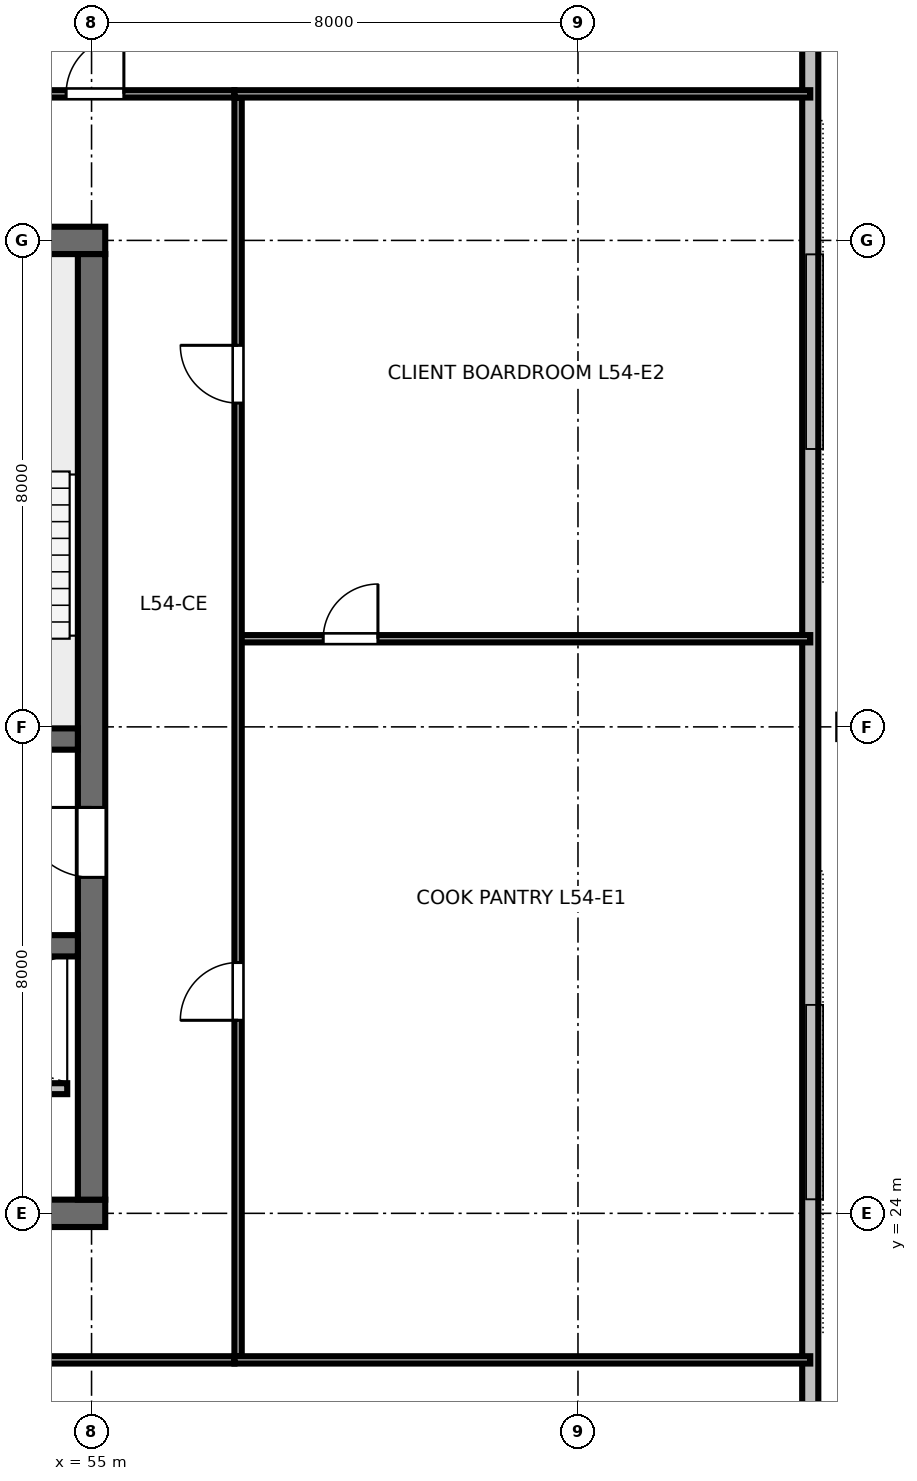
"""IFC4 building model, lengths in metres.
Left out: names, types, materials, properties, quantities, classifications, styles, units other than length and angle.
Written with IfcOpenShell. Run it as: python <this file> out.ifc"""

import sys

from ifc_helpers import new_model, si_unit, direction, frame, frame_2d, origin, origin_2d, place, context, subcontext, project, spatial, rectangle, i_section, extrude, element, fill, save


model = new_model("IFC4")
c1 = context("Model", 3, precision=1e-05, world=origin(), true_north=direction((0.0, 1.0)))
c2 = subcontext(c1, "Body", "Model", "MODEL_VIEW")
j1 = project(units=[si_unit("LENGTHUNIT", "METRE"), si_unit("PLANEANGLEUNIT", "RADIAN")], contexts=[c1])
p1 = place(None, origin())
s1 = spatial("IfcSite", under=j1, at=p1, CompositionType="ELEMENT")
p2 = place(p1, origin())
s2 = spatial("IfcBuilding", under=s1, at=p2, CompositionType="ELEMENT")
p3 = place(p2, frame((0.0, 0.0, 205.8)))
s3 = spatial("IfcBuildingStorey", under=s2, at=p3, CompositionType="ELEMENT", Elevation=205.8)
p4 = place(p3, frame((36.775, 24.0, 0.0), z_axis=(0.0, 0.0, 1.0), x_axis=(1.0, 0.0, 0.0)))
e1 = element("IfcWall", 1, at=p4, inside=s3, PredefinedType="SHEAR", context=c2, shape_type="SweptSolid", body=[
    extrude(rectangle(XDim=18.45, YDim=0.45, at=frame_2d((9.225, 0.0))), origin(), (0.0, 0.0, 1.0), 3.36),
])
p5 = place(p4, frame((13.425, 0.0, 0.0)))
e2 = element("IfcOpeningElement", 2, at=p5, cuts=e1, PredefinedType="OPENING", context=c2, shape_type="SweptSolid", body=[
    extrude(rectangle(XDim=1.6, YDim=2.15, at=frame_2d((0.8, 1.075))), frame((0.0, 0.235, 0.0), z_axis=(0.0, -1.0, 0.0), x_axis=(1.0, 0.0, 0.0)), (0.0, 0.0, 1.0), 0.47),
])
p6 = place(p3, frame((36.775, 40.0, 0.0), z_axis=(0.0, 0.0, 1.0), x_axis=(1.0, 0.0, 0.0)))
e3 = element("IfcWall", 3, at=p6, inside=s3, PredefinedType="SHEAR", context=c2, shape_type="SweptSolid", body=[
    extrude(rectangle(XDim=18.45, YDim=0.45, at=frame_2d((9.225, 0.0))), origin(), (0.0, 0.0, 1.0), 3.36),
])
p7 = place(p6, frame((8.725, 0.0, 0.0)))
e4 = element("IfcOpeningElement", 4, at=p7, cuts=e3, PredefinedType="OPENING", context=c2, shape_type="SweptSolid", body=[
    extrude(rectangle(XDim=1.0, YDim=2.15, at=frame_2d((0.5, 1.075))), frame((0.0, 0.235, 0.0), z_axis=(0.0, -1.0, 0.0), x_axis=(1.0, 0.0, 0.0)), (0.0, 0.0, 1.0), 0.47),
])
p8 = place(p3, frame((55.0, 24.225, 0.0), z_axis=(0.0, 0.0, 1.0), x_axis=(0.0, 1.0, 0.0)))
e5 = element("IfcWall", 5, at=p8, inside=s3, PredefinedType="SHEAR", context=c2, shape_type="SweptSolid", body=[
    extrude(rectangle(XDim=15.55, YDim=0.45, at=frame_2d((7.775, 0.0))), origin(), (0.0, 0.0, 1.0), 3.36),
])
p9 = place(p8, frame((5.3, 0.0, 0.0)))
e6 = element("IfcOpeningElement", 6, at=p9, cuts=e5, PredefinedType="OPENING", context=c2, shape_type="SweptSolid", body=[
    extrude(rectangle(XDim=1.15, YDim=2.15, at=frame_2d((0.575, 1.075))), frame((0.0, 0.235, 0.0), z_axis=(0.0, -1.0, 0.0), x_axis=(1.0, 0.0, 0.0)), (0.0, 0.0, 1.0), 0.47),
])
p10 = place(p3, frame((37.225, 31.8, 0.0), z_axis=(0.0, 0.0, 1.0), x_axis=(1.0, 0.0, 0.0)))
e7 = element("IfcWall", 7, at=p10, inside=s3, PredefinedType="SHEAR", context=c2, shape_type="SweptSolid", body=[
    extrude(rectangle(XDim=17.55, YDim=0.35, at=frame_2d((8.775, 0.0))), origin(), (0.0, 0.0, 1.0), 3.36),
])
p11 = place(p10, frame((0.825, 0.0, 0.0)))
e8 = element("IfcOpeningElement", 8, at=p11, cuts=e7, PredefinedType="OPENING", context=c2, shape_type="SweptSolid", body=[
    extrude(rectangle(XDim=1.1, YDim=2.15, at=frame_2d((0.55, 1.075))), frame((0.0, 0.185, 0.0), z_axis=(0.0, -1.0, 0.0), x_axis=(1.0, 0.0, 0.0)), (0.0, 0.0, 1.0), 0.37),
])
p12 = place(p10, frame((14.725, 0.0, 0.0)))
e9 = element("IfcOpeningElement", 9, at=p12, cuts=e7, PredefinedType="OPENING", context=c2, shape_type="SweptSolid", body=[
    extrude(rectangle(XDim=1.1, YDim=2.15, at=frame_2d((0.55, 1.075))), frame((0.0, 0.185, 0.0), z_axis=(0.0, -1.0, 0.0), x_axis=(1.0, 0.0, 0.0)), (0.0, 0.0, 1.0), 0.37),
])
p13 = place(p3, frame((37.225, 28.4, 0.0), z_axis=(0.0, 0.0, 1.0), x_axis=(1.0, 0.0, 0.0)))
e10 = element("IfcWall", 10, at=p13, inside=s3, PredefinedType="SHEAR", context=c2, shape_type="SweptSolid", body=[
    extrude(rectangle(XDim=17.55, YDim=0.35, at=frame_2d((8.775, 0.0))), origin(), (0.0, 0.0, 1.0), 3.36),
])
p14 = place(p3, frame((67.48, 32.0, 0.0), z_axis=(-0.178954370443, 0.0, 0.98385737447), x_axis=(0.98385737447, 0.0, 0.178954370443)))
e11 = element("IfcColumn", 11, at=p14, inside=s3, PredefinedType="COLUMN", context=c2, shape_type="SweptSolid", body=[
    extrude(i_section(OverallWidth=0.401, OverallDepth=0.399, WebThickness=0.025, FlangeThickness=0.04, FilletRadius=0.025, at=origin_2d()), origin(), (0.0, 0.0, 1.0), 3.428),
])
p15 = place(p3, frame((66.82, 18.76, 0.0), z_axis=(0.0, 0.0, 1.0), x_axis=(0.0, 1.0, 0.0)))
e12 = element("IfcWall", 12, at=p15, inside=s3, PredefinedType="STANDARD", context=c2, shape_type="SweptSolid", body=[
    extrude(rectangle(XDim=26.48, YDim=0.265, at=frame_2d((13.24, 0.0))), origin(), (0.0, 0.0, 1.0), 2.832),
])
p16 = place(p3, frame((47.6, 26.05, 0.0), z_axis=(0.0, 0.0, 1.0), x_axis=(1.0, 0.0, 0.0)))
e13 = element("IfcWall", 13, at=p16, inside=s3, PredefinedType="PARTITIONING", context=c2, shape_type="SweptSolid", body=[
    extrude(rectangle(XDim=7.0, YDim=0.18, at=frame_2d((3.5, 0.0))), origin(), (0.0, 0.0, 1.0), 3.375),
])
p17 = place(p16, frame((1.2, 0.0, 0.0)))
e14 = element("IfcOpeningElement", 14, at=p17, cuts=e13, PredefinedType="OPENING", context=c2, shape_type="SweptSolid", body=[
    extrude(rectangle(XDim=1.05, YDim=2.15, at=frame_2d((0.525, 1.075))), frame((0.0, 0.1, 0.0), z_axis=(0.0, -1.0, 0.0), x_axis=(1.0, 0.0, 0.0)), (0.0, 0.0, 1.0), 0.2),
])
p18 = place(p16, frame((3.4, 0.0, 0.0)))
e15 = element("IfcOpeningElement", 15, at=p18, cuts=e13, PredefinedType="OPENING", context=c2, shape_type="SweptSolid", body=[
    extrude(rectangle(XDim=1.05, YDim=2.15, at=frame_2d((0.525, 1.075))), frame((0.0, 0.1, 0.0), z_axis=(0.0, -1.0, 0.0), x_axis=(1.0, 0.0, 0.0)), (0.0, 0.0, 1.0), 0.2),
])
p19 = place(p3, frame((47.02, 21.59, 0.0), z_axis=(0.0, 0.0, 1.0), x_axis=(1.0, 0.0, 0.0)))
e16 = element("IfcWall", 16, at=p19, inside=s3, PredefinedType="PARTITIONING", context=c2, shape_type="SweptSolid", body=[
    extrude(rectangle(XDim=10.33, YDim=0.12, at=frame_2d((5.165, 0.0))), origin(), (0.0, 0.0, 1.0), 2.655),
])
p20 = place(p19, frame((5.59, 0.0, 0.0)))
e17 = element("IfcOpeningElement", 17, at=p20, cuts=e16, PredefinedType="OPENING", context=c2, shape_type="SweptSolid", body=[
    extrude(rectangle(XDim=0.95, YDim=2.15, at=frame_2d((0.475, 1.075))), frame((0.0, 0.07, 0.0), z_axis=(0.0, -1.0, 0.0), x_axis=(1.0, 0.0, 0.0)), (0.0, 0.0, 1.0), 0.14),
])
p21 = place(p3, frame((47.02, 42.41, 0.0), z_axis=(0.0, 0.0, 1.0), x_axis=(1.0, 0.0, 0.0)))
e18 = element("IfcWall", 18, at=p21, inside=s3, PredefinedType="PARTITIONING", context=c2, shape_type="SweptSolid", body=[
    extrude(rectangle(XDim=10.33, YDim=0.12, at=frame_2d((5.165, 0.0))), origin(), (0.0, 0.0, 1.0), 2.655),
])
p22 = place(p21, frame((2.467, 0.0, 0.0)))
e19 = element("IfcOpeningElement", 19, at=p22, cuts=e18, PredefinedType="OPENING", context=c2, shape_type="SweptSolid", body=[
    extrude(rectangle(XDim=0.95, YDim=2.15, at=frame_2d((0.475, 1.075))), frame((0.0, 0.07, 0.0), z_axis=(0.0, -1.0, 0.0), x_axis=(1.0, 0.0, 0.0)), (0.0, 0.0, 1.0), 0.14),
])
p23 = place(p21, frame((7.562, 0.0, 0.0)))
e20 = element("IfcOpeningElement", 20, at=p23, cuts=e18, PredefinedType="OPENING", context=c2, shape_type="SweptSolid", body=[
    extrude(rectangle(XDim=0.95, YDim=2.15, at=frame_2d((0.475, 1.075))), frame((0.0, 0.07, 0.0), z_axis=(0.0, -1.0, 0.0), x_axis=(1.0, 0.0, 0.0)), (0.0, 0.0, 1.0), 0.14),
])
p24 = place(p3, frame((57.41, 33.449, 0.0), z_axis=(0.0, 0.0, 1.0), x_axis=(1.0, 0.0, 0.0)))
e21 = element("IfcWall", 21, at=p24, inside=s3, PredefinedType="PARTITIONING", context=c2, shape_type="SweptSolid", body=[
    extrude(rectangle(XDim=9.41, YDim=0.12, at=frame_2d((4.705, 0.0))), origin(), (0.0, 0.0, 1.0), 2.655),
])
p25 = place(p24, frame((1.4, 0.0, 0.0)))
e22 = element("IfcOpeningElement", 22, at=p25, cuts=e21, PredefinedType="OPENING", context=c2, shape_type="SweptSolid", body=[
    extrude(rectangle(XDim=0.9, YDim=2.15, at=frame_2d((0.45, 1.075))), frame((0.0, 0.07, 0.0), z_axis=(0.0, -1.0, 0.0), x_axis=(1.0, 0.0, 0.0)), (0.0, 0.0, 1.0), 0.14),
])
p26 = place(p3, frame((57.41, 21.65, 0.0), z_axis=(0.0, 0.0, 1.0), x_axis=(0.0, 1.0, 0.0)))
e23 = element("IfcWall", 23, at=p26, inside=s3, PredefinedType="PARTITIONING", context=c2, shape_type="SweptSolid", body=[
    extrude(rectangle(XDim=20.7, YDim=0.12, at=frame_2d((10.35, 0.0))), origin(), (0.0, 0.0, 1.0), 2.655),
])
p27 = place(p26, frame((5.525, 0.0, 0.0)))
e24 = element("IfcOpeningElement", 24, at=p27, cuts=e23, PredefinedType="OPENING", context=c2, shape_type="SweptSolid", body=[
    extrude(rectangle(XDim=0.95, YDim=2.15, at=frame_2d((0.475, 1.075))), frame((0.0, 0.07, 0.0), z_axis=(0.0, -1.0, 0.0), x_axis=(1.0, 0.0, 0.0)), (0.0, 0.0, 1.0), 0.14),
])
p28 = place(p26, frame((15.675, 0.0, 0.0)))
e25 = element("IfcOpeningElement", 25, at=p28, cuts=e23, PredefinedType="OPENING", context=c2, shape_type="SweptSolid", body=[
    extrude(rectangle(XDim=0.95, YDim=2.15, at=frame_2d((0.475, 1.075))), frame((0.0, 0.07, 0.0), z_axis=(0.0, -1.0, 0.0), x_axis=(1.0, 0.0, 0.0)), (0.0, 0.0, 1.0), 0.14),
])
for number, where, z_axis, x_axis in (
    (26, (57.35, 21.59, 0.0), (0.0, 0.0, 1.0), (1.0, 0.0, 0.0)),
    (27, (57.35, 42.41, 0.0), (0.0, 0.0, 1.0), (1.0, 0.0, 0.0)),
):
    element("IfcWall", number, at=place(p3, frame(where, z_axis=z_axis, x_axis=x_axis)), inside=s3, PredefinedType="PARTITIONING", context=c2, shape_type="SweptSolid", body=[
        extrude(rectangle(XDim=9.47, YDim=0.12, at=frame_2d((4.735, 0.0))), origin(), (0.0, 0.0, 1.0), 2.655),
    ])
p29 = place(p9, origin())
e28 = element("IfcDoor", 28, at=p29, inside=s3, OperationType="SINGLE_SWING_RIGHT", PredefinedType="DOOR", context=c2, shape_type="SweptSolid", body=[
    extrude(rectangle(XDim=1.15, YDim=2.15, at=frame_2d((0.575, 1.075))), frame((0.0, 0.025, 0.0), z_axis=(0.0, -1.0, 0.0), x_axis=(1.0, 0.0, 0.0)), (0.0, 0.0, 1.0), 0.05),
])
fill(e6, e28)
p30 = place(p23, origin())
e29 = element("IfcDoor", 29, at=p30, inside=s3, OperationType="SINGLE_SWING_RIGHT", PredefinedType="DOOR", context=c2, shape_type="SweptSolid", body=[
    extrude(rectangle(XDim=0.95, YDim=2.15, at=frame_2d((0.475, 1.075))), frame((0.0, 0.025, 0.0), z_axis=(0.0, -1.0, 0.0), x_axis=(1.0, 0.0, 0.0)), (0.0, 0.0, 1.0), 0.05),
])
fill(e20, e29)
p31 = place(p25, origin())
e30 = element("IfcDoor", 30, at=p31, inside=s3, OperationType="SINGLE_SWING_RIGHT", PredefinedType="DOOR", context=c2, shape_type="SweptSolid", body=[
    extrude(rectangle(XDim=0.9, YDim=2.15, at=frame_2d((0.45, 1.075))), frame((0.0, 0.025, 0.0), z_axis=(0.0, -1.0, 0.0), x_axis=(1.0, 0.0, 0.0)), (0.0, 0.0, 1.0), 0.05),
])
fill(e22, e30)
p32 = place(p27, origin())
e31 = element("IfcDoor", 31, at=p32, inside=s3, OperationType="SINGLE_SWING_LEFT", PredefinedType="DOOR", context=c2, shape_type="SweptSolid", body=[
    extrude(rectangle(XDim=0.95, YDim=2.15, at=frame_2d((0.475, 1.075))), frame((0.0, 0.025, 0.0), z_axis=(0.0, -1.0, 0.0), x_axis=(1.0, 0.0, 0.0)), (0.0, 0.0, 1.0), 0.05),
])
fill(e24, e31)
p33 = place(p28, origin())
e32 = element("IfcDoor", 32, at=p33, inside=s3, OperationType="SINGLE_SWING_RIGHT", PredefinedType="DOOR", context=c2, shape_type="SweptSolid", body=[
    extrude(rectangle(XDim=0.95, YDim=2.15, at=frame_2d((0.475, 1.075))), frame((0.0, 0.025, 0.0), z_axis=(0.0, -1.0, 0.0), x_axis=(1.0, 0.0, 0.0)), (0.0, 0.0, 1.0), 0.05),
])
fill(e25, e32)
save(model, sys.argv[1])
